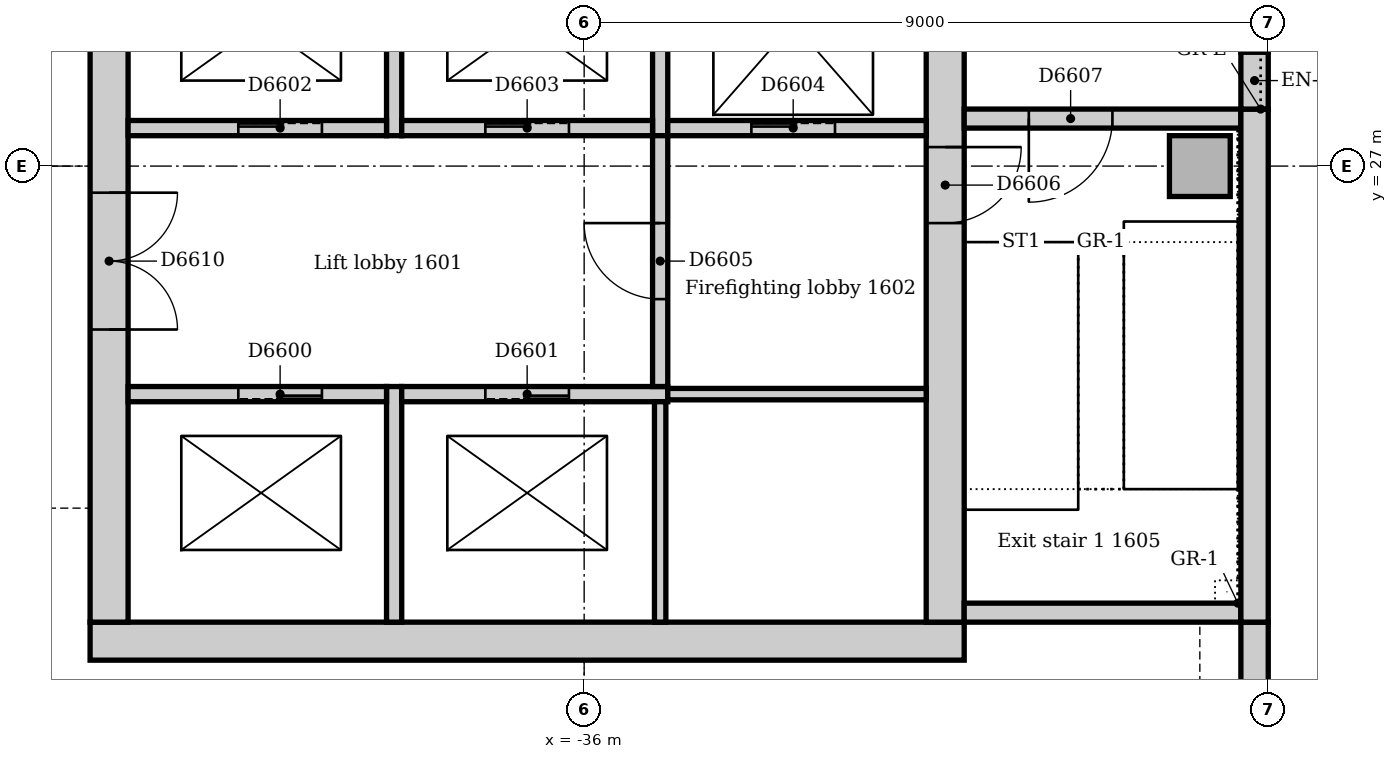
"""IFC4 building model, lengths in metres.
Left out: names, types, materials, properties, quantities, classifications, styles, units other than length and angle.
Written with IfcOpenShell. Run it as: python <this file> out.ifc"""

import sys

from ifc_helpers import new_model, si_unit, direction, frame, frame_2d, origin, origin_2d, place, context, subcontext, project, spatial, rectangle, extrude, element, fill, save


model = new_model("IFC4")
c1 = context("Model", 3, precision=1e-05, world=origin(), true_north=direction((0.0, 1.0)))
c2 = subcontext(c1, "Body", "Model", "MODEL_VIEW")
j1 = project(units=[si_unit("LENGTHUNIT", "METRE"), si_unit("PLANEANGLEUNIT", "RADIAN")], contexts=[c1])
p1 = place(None, origin())
s1 = spatial("IfcSite", under=j1, at=p1, CompositionType="ELEMENT")
p2 = place(p1, origin())
s2 = spatial("IfcBuilding", under=s1, at=p2, CompositionType="ELEMENT")
p3 = place(p2, frame((0.0, 0.0, 71.0)))
s3 = spatial("IfcBuildingStorey", under=s2, at=p3, CompositionType="ELEMENT", Elevation=71.0)
p4 = place(p3, frame((-42.5, 20.75, 0.0), z_axis=(0.0, 0.0, 1.0), x_axis=(1.0, 0.0, 0.0)))
e1 = element("IfcWall", 1, at=p4, inside=s3, PredefinedType="SOLIDWALL", context=c2, shape_type="SweptSolid", body=[
    extrude(rectangle(XDim=11.5, YDim=0.5, at=frame_2d((5.75, 0.0))), origin(), (0.0, 0.0, 1.0), 4.0),
])
p5 = place(p3, frame((-31.25, 21.0, 0.0), z_axis=(0.0, 0.0, 1.0), x_axis=(0.0, 1.0, 0.0)))
e2 = element("IfcWall", 2, at=p5, inside=s3, PredefinedType="SOLIDWALL", context=c2, shape_type="SweptSolid", body=[
    extrude(rectangle(XDim=9.5, YDim=0.5, at=frame_2d((4.75, 0.0))), origin(), (0.0, 0.0, 1.0), 4.0),
])
p6 = place(p5, frame((5.25, 0.0, 0.0)))
e3 = element("IfcOpeningElement", 3, at=p6, cuts=e2, PredefinedType="OPENING", context=c2, shape_type="SweptSolid", body=[
    extrude(rectangle(XDim=1.0, YDim=2.1, at=frame_2d((0.5, 1.05))), frame((0.0, 0.26, 0.0), z_axis=(0.0, -1.0, 0.0), x_axis=(1.0, 0.0, 0.0)), (0.0, 0.0, 1.0), 0.52),
])
p7 = place(p3, frame((-42.25, 30.5, 0.0), z_axis=(0.0, 0.0, 1.0), x_axis=(0.0, -1.0, 0.0)))
e4 = element("IfcWall", 4, at=p7, inside=s3, PredefinedType="SOLIDWALL", context=c2, shape_type="SweptSolid", body=[
    extrude(rectangle(XDim=9.5, YDim=0.5, at=frame_2d((4.75, 0.0))), origin(), (0.0, 0.0, 1.0), 4.0),
])
p8 = place(p7, frame((3.85, 0.0, 0.0)))
e5 = element("IfcOpeningElement", 5, at=p8, cuts=e4, PredefinedType="OPENING", context=c2, shape_type="SweptSolid", body=[
    extrude(rectangle(XDim=1.8, YDim=2.1, at=frame_2d((0.9, 1.05))), frame((0.0, 0.26, 0.0), z_axis=(0.0, -1.0, 0.0), x_axis=(1.0, 0.0, 0.0)), (0.0, 0.0, 1.0), 0.52),
])
p9 = place(p3, frame((-31.0, 21.125, 0.0), z_axis=(0.0, 0.0, 1.0), x_axis=(1.0, 0.0, 0.0)))
e6 = element("IfcWall", 6, at=p9, inside=s3, PredefinedType="SOLIDWALL", context=c2, shape_type="SweptSolid", body=[
    extrude(rectangle(XDim=3.64, YDim=0.25, at=frame_2d((1.82, 0.0))), origin(), (0.0, 0.0, 1.0), 4.0),
])
p10 = place(p3, frame((-27.36, 27.625, 0.0), z_axis=(0.0, 0.0, 1.0), x_axis=(-1.0, 0.0, 0.0)))
e7 = element("IfcWall", 7, at=p10, inside=s3, PredefinedType="SOLIDWALL", context=c2, shape_type="SweptSolid", body=[
    extrude(rectangle(XDim=3.64, YDim=0.25, at=frame_2d((1.82, 0.0))), origin(), (0.0, 0.0, 1.0), 4.0),
])
p11 = place(p10, frame((1.69, 0.0, 0.0)))
e8 = element("IfcOpeningElement", 8, at=p11, cuts=e7, PredefinedType="OPENING", context=c2, shape_type="SweptSolid", body=[
    extrude(rectangle(XDim=1.1, YDim=2.1, at=frame_2d((0.55, 1.05))), frame((0.0, 0.135, 0.0), z_axis=(0.0, -1.0, 0.0), x_axis=(1.0, 0.0, 0.0)), (0.0, 0.0, 1.0), 0.27),
])
p12 = place(p3, frame((-27.9, 27.0, 0.0), z_axis=(0.0, 0.0, 1.0), x_axis=(1.0, 0.0, 0.0)))
e9 = element("IfcColumn", 9, at=p12, inside=s3, PredefinedType="COLUMN", context=c2, shape_type="SweptSolid", body=[
    extrude(rectangle(XDim=0.8, YDim=0.8, at=origin_2d()), origin(), (0.0, 0.0, 1.0), 4.0),
])
p13 = place(p3, frame((-27.18, 13.243, 0.0), z_axis=(0.0, 0.0, 1.0), x_axis=(0.0, 1.0, 0.0)))
e10 = element("IfcWall", 10, at=p13, inside=s3, PredefinedType="STANDARD", context=c2, shape_type="SweptSolid", body=[
    extrude(rectangle(XDim=7.757, YDim=0.36, at=frame_2d((3.879, 0.0))), origin(), (0.0, 0.0, 1.0), 3.85),
])
p14 = place(p13, frame((1.982, 0.0, 0.9)))
e11 = element("IfcOpeningElement", 11, at=p14, cuts=e10, PredefinedType="OPENING", context=c2, shape_type="SweptSolid", body=[
    extrude(rectangle(XDim=3.3, YDim=1.6, at=frame_2d((1.65, 0.8))), frame((0.0, 0.19, 0.0), z_axis=(0.0, -1.0, 0.0), x_axis=(1.0, 0.0, 0.0)), (0.0, 0.0, 1.0), 0.38),
])
p15 = place(p3, frame((-27.18, 21.0, 0.0), z_axis=(0.0, 0.0, 1.0), x_axis=(0.0, 1.0, 0.0)))
e12 = element("IfcWall", 12, at=p15, inside=s3, PredefinedType="STANDARD", context=c2, shape_type="SweptSolid", body=[
    extrude(rectangle(XDim=6.75, YDim=0.36, at=frame_2d((3.375, 0.0))), origin(), (0.0, 0.0, 1.0), 3.85),
])
p16 = place(p3, frame((-27.18, 27.75, 0.0), z_axis=(0.0, 0.0, 1.0), x_axis=(0.0, 1.0, 0.0)))
e13 = element("IfcWall", 13, at=p16, inside=s3, PredefinedType="STANDARD", context=c2, shape_type="SweptSolid", body=[
    extrude(rectangle(XDim=0.75, YDim=0.36, at=frame_2d((0.375, 0.0))), origin(), (0.0, 0.0, 1.0), 3.85),
])
p17 = place(p3, frame((-38.5, 21.0, 0.0), z_axis=(0.0, 0.0, 1.0), x_axis=(0.0, 1.0, 0.0)))
e14 = element("IfcWall", 14, at=p17, inside=s3, PredefinedType="SOLIDWALL", context=c2, shape_type="SweptSolid", body=[
    extrude(rectangle(XDim=3.1, YDim=0.2, at=frame_2d((1.55, 0.0))), origin(), (0.0, 0.0, 1.0), 4.0),
])
p18 = place(p3, frame((-38.6, 24.0, 0.0), z_axis=(0.0, 0.0, 1.0), x_axis=(-1.0, 0.0, 0.0)))
e15 = element("IfcWall", 15, at=p18, inside=s3, PredefinedType="SOLIDWALL", context=c2, shape_type="SweptSolid", body=[
    extrude(rectangle(XDim=3.4, YDim=0.2, at=frame_2d((1.7, 0.0))), origin(), (0.0, 0.0, 1.0), 4.0),
])
p19 = place(p18, frame((0.85, 0.0, 0.0)))
e16 = element("IfcOpeningElement", 16, at=p19, cuts=e15, PredefinedType="OPENING", context=c2, shape_type="SweptSolid", body=[
    extrude(rectangle(XDim=1.1, YDim=2.1, at=frame_2d((0.55, 1.05))), frame((0.0, 0.11, 0.0), z_axis=(0.0, -1.0, 0.0), x_axis=(1.0, 0.0, 0.0)), (0.0, 0.0, 1.0), 0.22),
])
p20 = place(p3, frame((-34.9, 24.0, 0.0), z_axis=(0.0, 0.0, 1.0), x_axis=(-1.0, 0.0, 0.0)))
e17 = element("IfcWall", 17, at=p20, inside=s3, PredefinedType="SOLIDWALL", context=c2, shape_type="SweptSolid", body=[
    extrude(rectangle(XDim=3.5, YDim=0.2, at=frame_2d((1.75, 0.0))), origin(), (0.0, 0.0, 1.0), 4.0),
])
p21 = place(p20, frame((1.3, 0.0, 0.0)))
e18 = element("IfcOpeningElement", 18, at=p21, cuts=e17, PredefinedType="OPENING", context=c2, shape_type="SweptSolid", body=[
    extrude(rectangle(XDim=1.1, YDim=2.1, at=frame_2d((0.55, 1.05))), frame((0.0, 0.11, 0.0), z_axis=(0.0, -1.0, 0.0), x_axis=(1.0, 0.0, 0.0)), (0.0, 0.0, 1.0), 0.22),
])
p22 = place(p3, frame((-38.5, 27.4, 0.0), z_axis=(0.0, 0.0, 1.0), x_axis=(0.0, 1.0, 0.0)))
e19 = element("IfcWall", 19, at=p22, inside=s3, PredefinedType="SOLIDWALL", context=c2, shape_type="SweptSolid", body=[
    extrude(rectangle(XDim=2.85, YDim=0.2, at=frame_2d((1.425, 0.0))), origin(), (0.0, 0.0, 1.0), 4.0),
])
p23 = place(p3, frame((-42.0, 27.5, 0.0), z_axis=(0.0, 0.0, 1.0), x_axis=(1.0, 0.0, 0.0)))
e20 = element("IfcWall", 20, at=p23, inside=s3, PredefinedType="SOLIDWALL", context=c2, shape_type="SweptSolid", body=[
    extrude(rectangle(XDim=3.4, YDim=0.2, at=frame_2d((1.7, 0.0))), origin(), (0.0, 0.0, 1.0), 4.0),
])
p24 = place(p23, frame((1.45, 0.0, 0.0)))
e21 = element("IfcOpeningElement", 21, at=p24, cuts=e20, PredefinedType="OPENING", context=c2, shape_type="SweptSolid", body=[
    extrude(rectangle(XDim=1.1, YDim=2.1, at=frame_2d((0.55, 1.05))), frame((0.0, 0.11, 0.0), z_axis=(0.0, -1.0, 0.0), x_axis=(1.0, 0.0, 0.0)), (0.0, 0.0, 1.0), 0.22),
])
p25 = place(p3, frame((-35.0, 27.4, 0.0), z_axis=(0.0, 0.0, 1.0), x_axis=(0.0, 1.0, 0.0)))
e22 = element("IfcWall", 22, at=p25, inside=s3, PredefinedType="SOLIDWALL", context=c2, shape_type="SweptSolid", body=[
    extrude(rectangle(XDim=2.85, YDim=0.2, at=frame_2d((1.425, 0.0))), origin(), (0.0, 0.0, 1.0), 4.0),
])
p26 = place(p3, frame((-38.4, 27.5, 0.0), z_axis=(0.0, 0.0, 1.0), x_axis=(1.0, 0.0, 0.0)))
e23 = element("IfcWall", 23, at=p26, inside=s3, PredefinedType="SOLIDWALL", context=c2, shape_type="SweptSolid", body=[
    extrude(rectangle(XDim=3.3, YDim=0.2, at=frame_2d((1.65, 0.0))), origin(), (0.0, 0.0, 1.0), 4.0),
])
p27 = place(p26, frame((1.1, 0.0, 0.0)))
e24 = element("IfcOpeningElement", 24, at=p27, cuts=e23, PredefinedType="OPENING", context=c2, shape_type="SweptSolid", body=[
    extrude(rectangle(XDim=1.1, YDim=2.1, at=frame_2d((0.55, 1.05))), frame((0.0, 0.11, 0.0), z_axis=(0.0, -1.0, 0.0), x_axis=(1.0, 0.0, 0.0)), (0.0, 0.0, 1.0), 0.22),
])
p28 = place(p3, frame((-34.9, 27.5, 0.0), z_axis=(0.0, 0.0, 1.0), x_axis=(1.0, 0.0, 0.0)))
e25 = element("IfcWall", 25, at=p28, inside=s3, PredefinedType="SOLIDWALL", context=c2, shape_type="SweptSolid", body=[
    extrude(rectangle(XDim=3.4, YDim=0.2, at=frame_2d((1.7, 0.0))), origin(), (0.0, 0.0, 1.0), 4.0),
])
p29 = place(p28, frame((1.1, 0.0, 0.0)))
e26 = element("IfcOpeningElement", 26, at=p29, cuts=e25, PredefinedType="OPENING", context=c2, shape_type="SweptSolid", body=[
    extrude(rectangle(XDim=1.1, YDim=2.1, at=frame_2d((0.55, 1.05))), frame((0.0, 0.11, 0.0), z_axis=(0.0, -1.0, 0.0), x_axis=(1.0, 0.0, 0.0)), (0.0, 0.0, 1.0), 0.22),
])
p30 = place(p3, frame((-35.0, 24.1, 0.0), z_axis=(0.0, 0.0, 1.0), x_axis=(0.0, 1.0, 0.0)))
e27 = element("IfcWall", 27, at=p30, inside=s3, PredefinedType="SOLIDWALL", context=c2, shape_type="SweptSolid", body=[
    extrude(rectangle(XDim=3.3, YDim=0.2, at=frame_2d((1.65, 0.0))), origin(), (0.0, 0.0, 1.0), 4.0),
])
p31 = place(p30, frame((1.15, 0.0, 0.0)))
e28 = element("IfcOpeningElement", 28, at=p31, cuts=e27, PredefinedType="OPENING", context=c2, shape_type="SweptSolid", body=[
    extrude(rectangle(XDim=1.0, YDim=2.1, at=frame_2d((0.5, 1.05))), frame((0.0, 0.11, 0.0), z_axis=(0.0, -1.0, 0.0), x_axis=(1.0, 0.0, 0.0)), (0.0, 0.0, 1.0), 0.22),
])
p32 = place(p3, frame((-35.0, 21.0, 0.0), z_axis=(0.0, 0.0, 1.0), x_axis=(0.0, 1.0, 0.0)))
e29 = element("IfcWall", 29, at=p32, inside=s3, PredefinedType="SOLIDWALL", context=c2, shape_type="SweptSolid", body=[
    extrude(rectangle(XDim=2.9, YDim=0.15, at=frame_2d((1.45, 0.0))), origin(), (0.0, 0.0, 1.0), 4.0),
])
p33 = place(p3, frame((-31.5, 24.0, 0.0), z_axis=(0.0, 0.0, 1.0), x_axis=(-1.0, 0.0, 0.0)))
e30 = element("IfcWall", 30, at=p33, inside=s3, PredefinedType="SOLIDWALL", context=c2, shape_type="SweptSolid", body=[
    extrude(rectangle(XDim=3.4, YDim=0.15, at=frame_2d((1.7, 0.0))), origin(), (0.0, 0.0, 1.0), 4.0),
])
p34 = place(p19, origin())
e31 = element("IfcDoor", 31, at=p34, inside=s3, OperationType="SLIDING_TO_LEFT", PredefinedType="DOOR", context=c2, shape_type="SweptSolid", body=[
    extrude(rectangle(XDim=1.1, YDim=2.1, at=frame_2d((0.55, 1.05))), frame((0.0, 0.025, 0.0), z_axis=(0.0, -1.0, 0.0), x_axis=(1.0, 0.0, 0.0)), (0.0, 0.0, 1.0), 0.05),
])
fill(e16, e31)
p35 = place(p21, origin())
e32 = element("IfcDoor", 32, at=p35, inside=s3, OperationType="SLIDING_TO_LEFT", PredefinedType="DOOR", context=c2, shape_type="SweptSolid", body=[
    extrude(rectangle(XDim=1.1, YDim=2.1, at=frame_2d((0.55, 1.05))), frame((0.0, 0.025, 0.0), z_axis=(0.0, -1.0, 0.0), x_axis=(1.0, 0.0, 0.0)), (0.0, 0.0, 1.0), 0.05),
])
fill(e18, e32)
p36 = place(p24, origin())
e33 = element("IfcDoor", 33, at=p36, inside=s3, OperationType="SLIDING_TO_LEFT", PredefinedType="DOOR", context=c2, shape_type="SweptSolid", body=[
    extrude(rectangle(XDim=1.1, YDim=2.1, at=frame_2d((0.55, 1.05))), frame((0.0, 0.025, 0.0), z_axis=(0.0, -1.0, 0.0), x_axis=(1.0, 0.0, 0.0)), (0.0, 0.0, 1.0), 0.05),
])
fill(e21, e33)
p37 = place(p27, origin())
e34 = element("IfcDoor", 34, at=p37, inside=s3, OperationType="SLIDING_TO_LEFT", PredefinedType="DOOR", context=c2, shape_type="SweptSolid", body=[
    extrude(rectangle(XDim=1.1, YDim=2.1, at=frame_2d((0.55, 1.05))), frame((0.0, 0.025, 0.0), z_axis=(0.0, -1.0, 0.0), x_axis=(1.0, 0.0, 0.0)), (0.0, 0.0, 1.0), 0.05),
])
fill(e24, e34)
p38 = place(p29, origin())
e35 = element("IfcDoor", 35, at=p38, inside=s3, OperationType="SLIDING_TO_LEFT", PredefinedType="DOOR", context=c2, shape_type="SweptSolid", body=[
    extrude(rectangle(XDim=1.1, YDim=2.1, at=frame_2d((0.55, 1.05))), frame((0.0, 0.025, 0.0), z_axis=(0.0, -1.0, 0.0), x_axis=(1.0, 0.0, 0.0)), (0.0, 0.0, 1.0), 0.05),
])
fill(e26, e35)
p39 = place(p31, origin())
e36 = element("IfcDoor", 36, at=p39, inside=s3, OperationType="SINGLE_SWING_RIGHT", PredefinedType="DOOR", context=c2, shape_type="SweptSolid", body=[
    extrude(rectangle(XDim=1.0, YDim=2.1, at=frame_2d((0.5, 1.05))), frame((0.0, 0.025, 0.0), z_axis=(0.0, -1.0, 0.0), x_axis=(1.0, 0.0, 0.0)), (0.0, 0.0, 1.0), 0.05),
])
fill(e28, e36)
p40 = place(p6, frame((1.0, 0.0, 0.0), z_axis=(0.0, 0.0, 1.0), x_axis=(-1.0, 0.0, 0.0)))
e37 = element("IfcDoor", 37, at=p40, inside=s3, OperationType="SINGLE_SWING_LEFT", PredefinedType="DOOR", context=c2, shape_type="SweptSolid", body=[
    extrude(rectangle(XDim=1.0, YDim=2.1, at=frame_2d((0.5, 1.05))), frame((0.0, 0.025, 0.0), z_axis=(0.0, -1.0, 0.0), x_axis=(1.0, 0.0, 0.0)), (0.0, 0.0, 1.0), 0.05),
])
fill(e3, e37)
p41 = place(p11, origin())
e38 = element("IfcDoor", 38, at=p41, inside=s3, OperationType="SINGLE_SWING_RIGHT", PredefinedType="DOOR", context=c2, shape_type="SweptSolid", body=[
    extrude(rectangle(XDim=1.1, YDim=2.1, at=frame_2d((0.55, 1.05))), frame((0.0, 0.025, 0.0), z_axis=(0.0, -1.0, 0.0), x_axis=(1.0, 0.0, 0.0)), (0.0, 0.0, 1.0), 0.05),
])
fill(e8, e38)
p42 = place(p8, origin())
e39 = element("IfcDoor", 39, at=p42, inside=s3, OperationType="DOUBLE_DOOR_SINGLE_SWING", PredefinedType="DOOR", context=c2, shape_type="SweptSolid", body=[
    extrude(rectangle(XDim=1.8, YDim=2.1, at=frame_2d((0.9, 1.05))), frame((0.0, 0.025, 0.0), z_axis=(0.0, -1.0, 0.0), x_axis=(1.0, 0.0, 0.0)), (0.0, 0.0, 1.0), 0.05),
])
fill(e5, e39)
save(model, sys.argv[1])
